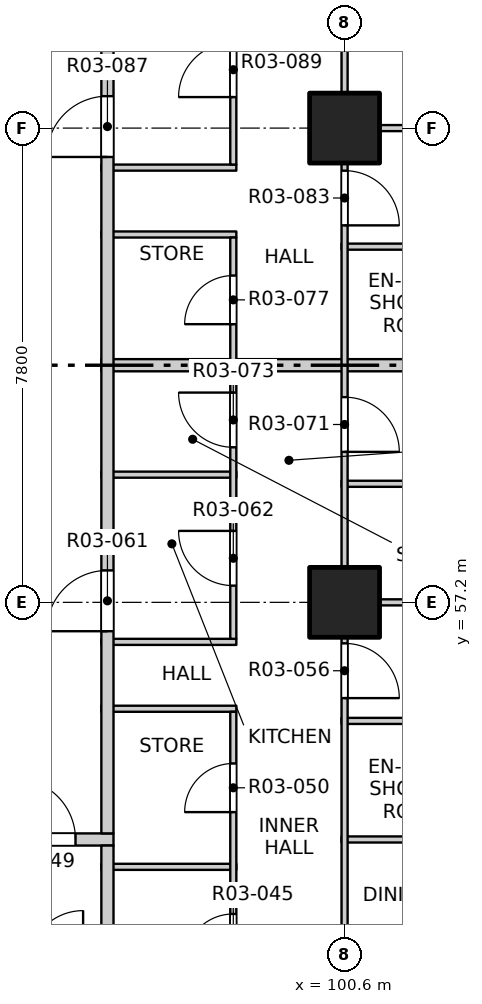
"""IFC4 building model, lengths in metres.
Left out: names, types, materials, properties, quantities, classifications, styles, units other than length and angle.
Written with IfcOpenShell. Run it as: python <this file> out.ifc"""

import sys

from ifc_helpers import new_model, si_unit, direction, frame, frame_2d, origin, origin_2d, place, context, subcontext, project, spatial, rectangle, extrude, element, fill, save


model = new_model("IFC4")
c1 = context("Model", 3, precision=1e-05, world=origin(), true_north=direction((0.0, 1.0)))
c2 = subcontext(c1, "Body", "Model", "MODEL_VIEW")
j1 = project(units=[si_unit("LENGTHUNIT", "METRE"), si_unit("PLANEANGLEUNIT", "RADIAN")], contexts=[c1])
p1 = place(None, origin())
s1 = spatial("IfcSite", under=j1, at=p1, CompositionType="ELEMENT")
p2 = place(p1, origin())
s2 = spatial("IfcBuilding", under=s1, at=p2, CompositionType="ELEMENT")
p3 = place(p2, frame((0.0, 0.0, 43.3)))
s3 = spatial("IfcBuildingStorey", under=s2, at=p3, CompositionType="ELEMENT", Elevation=43.3)
for number, where, z_axis, x_axis in (
    (1, (100.6, 57.2, -0.25), (0.0, 0.0, 1.0), (1.0, 0.0, 0.0)),
    (2, (100.6, 65.0, -0.25), (0.0, 0.0, 1.0), (1.0, 0.0, 0.0)),
):
    element("IfcColumn", number, at=place(p3, frame(where, z_axis=z_axis, x_axis=x_axis)), inside=s3, PredefinedType="COLUMN", context=c2, shape_type="SweptSolid", body=[
        extrude(rectangle(XDim=1.15, YDim=1.15, at=origin_2d()), origin(), (0.0, 0.0, 1.0), 3.35),
    ])
p4 = place(p3, frame((96.6, 52.85, 0.0), z_axis=(0.0, 0.0, 1.0), x_axis=(1.0, 0.0, 0.0)))
e3 = element("IfcWall", 3, at=p4, inside=s3, PredefinedType="PARTITIONING", context=c2, shape_type="SweptSolid", body=[
    extrude(rectangle(XDim=2.22, YDim=0.1, at=frame_2d((1.11, 0.0))), origin(), (0.0, 0.0, 1.0), 3.1),
])
p5 = place(p3, frame((73.2, 53.3, 0.0), z_axis=(0.0, 0.0, 1.0), x_axis=(1.0, 0.0, 0.0)))
e4 = element("IfcWall", 4, at=p5, inside=s3, PredefinedType="PARTITIONING", context=c2, shape_type="SweptSolid", body=[
    extrude(rectangle(XDim=23.6, YDim=0.2, at=frame_2d((11.8, 0.0))), origin(), (0.0, 0.0, 1.0), 3.1),
])
p6 = place(p5, frame((2.825, 0.0, 0.0)))
e5 = element("IfcOpeningElement", 5, at=p6, cuts=e4, PredefinedType="OPENING", context=c2, shape_type="SweptSolid", body=[
    extrude(rectangle(XDim=1.0, YDim=2.1, at=frame_2d((0.5, 1.05))), frame((0.0, 0.11, 0.0), z_axis=(0.0, -1.0, 0.0), x_axis=(1.0, 0.0, 0.0)), (0.0, 0.0, 1.0), 0.22),
])
p7 = place(p5, frame((14.025, 0.0, 0.0)))
e6 = element("IfcOpeningElement", 6, at=p7, cuts=e4, PredefinedType="OPENING", context=c2, shape_type="SweptSolid", body=[
    extrude(rectangle(XDim=1.0, YDim=2.1, at=frame_2d((0.5, 1.05))), frame((0.0, 0.11, 0.0), z_axis=(0.0, -1.0, 0.0), x_axis=(1.0, 0.0, 0.0)), (0.0, 0.0, 1.0), 0.22),
])
p8 = place(p5, frame((21.975, 0.0, 0.0)))
e7 = element("IfcOpeningElement", 7, at=p8, cuts=e4, PredefinedType="OPENING", context=c2, shape_type="SweptSolid", body=[
    extrude(rectangle(XDim=1.0, YDim=2.1, at=frame_2d((0.5, 1.05))), frame((0.0, 0.11, 0.0), z_axis=(0.0, -1.0, 0.0), x_axis=(1.0, 0.0, 0.0)), (0.0, 0.0, 1.0), 0.22),
])
p9 = place(p3, frame((100.55, 53.3, 0.0), z_axis=(0.0, 0.0, 1.0), x_axis=(1.0, 0.0, 0.0)))
e8 = element("IfcWall", 8, at=p9, inside=s3, PredefinedType="PARTITIONING", context=c2, shape_type="SweptSolid", body=[
    extrude(rectangle(XDim=7.55, YDim=0.1, at=frame_2d((3.775, 0.0))), origin(), (0.0, 0.0, 1.0), 3.1),
])
p10 = place(p3, frame((100.55, 55.25, 0.0), z_axis=(0.0, 0.0, 1.0), x_axis=(1.0, 0.0, 0.0)))
e9 = element("IfcWall", 9, at=p10, inside=s3, PredefinedType="PARTITIONING", context=c2, shape_type="SweptSolid", body=[
    extrude(rectangle(XDim=3.55, YDim=0.1, at=frame_2d((1.775, 0.0))), origin(), (0.0, 0.0, 1.0), 3.1),
])
for number, where, z_axis, x_axis in (
    (10, (96.6, 55.45, 0.0), (0.0, 0.0, 1.0), (1.0, 0.0, 0.0)),
    (11, (96.6, 56.55, 0.0), (0.0, 0.0, 1.0), (1.0, 0.0, 0.0)),
):
    element("IfcWall", number, at=place(p3, frame(where, z_axis=z_axis, x_axis=x_axis)), inside=s3, PredefinedType="PARTITIONING", context=c2, shape_type="SweptSolid", body=[
        extrude(rectangle(XDim=2.22, YDim=0.1, at=frame_2d((1.11, 0.0))), origin(), (0.0, 0.0, 1.0), 3.1),
    ])
p11 = place(p3, frame((100.55, 57.2, 0.0), z_axis=(0.0, 0.0, 1.0), x_axis=(1.0, 0.0, 0.0)))
e12 = element("IfcWall", 12, at=p11, inside=s3, PredefinedType="PARTITIONING", context=c2, shape_type="SweptSolid", body=[
    extrude(rectangle(XDim=7.55, YDim=0.1, at=frame_2d((3.775, 0.0))), origin(), (0.0, 0.0, 1.0), 3.1),
])
p12 = place(p3, frame((100.55, 59.15, 0.0), z_axis=(0.0, 0.0, 1.0), x_axis=(1.0, 0.0, 0.0)))
e13 = element("IfcWall", 13, at=p12, inside=s3, PredefinedType="PARTITIONING", context=c2, shape_type="SweptSolid", body=[
    extrude(rectangle(XDim=3.55, YDim=0.1, at=frame_2d((1.775, 0.0))), origin(), (0.0, 0.0, 1.0), 3.1),
])
p13 = place(p3, frame((96.6, 59.3, 0.0), z_axis=(0.0, 0.0, 1.0), x_axis=(1.0, 0.0, 0.0)))
e14 = element("IfcWall", 14, at=p13, inside=s3, PredefinedType="PARTITIONING", context=c2, shape_type="SweptSolid", body=[
    extrude(rectangle(XDim=2.22, YDim=0.1, at=frame_2d((1.11, 0.0))), origin(), (0.0, 0.0, 1.0), 3.1),
])
p14 = place(p3, frame((96.6, 61.1, 0.0), z_axis=(0.0, 0.0, 1.0), x_axis=(1.0, 0.0, 0.0)))
e15 = element("IfcWall", 15, at=p14, inside=s3, PredefinedType="PARTITIONING", context=c2, shape_type="SweptSolid", body=[
    extrude(rectangle(XDim=11.5, YDim=0.2, at=frame_2d((5.75, 0.0))), origin(), (0.0, 0.0, 1.0), 3.1),
])
p15 = place(p3, frame((100.55, 63.05, 0.0), z_axis=(0.0, 0.0, 1.0), x_axis=(1.0, 0.0, 0.0)))
e16 = element("IfcWall", 16, at=p15, inside=s3, PredefinedType="PARTITIONING", context=c2, shape_type="SweptSolid", body=[
    extrude(rectangle(XDim=3.55, YDim=0.1, at=frame_2d((1.775, 0.0))), origin(), (0.0, 0.0, 1.0), 3.1),
])
for number, where, z_axis, x_axis in (
    (17, (96.6, 63.25, 0.0), (0.0, 0.0, 1.0), (1.0, 0.0, 0.0)),
    (18, (96.6, 64.35, 0.0), (0.0, 0.0, 1.0), (1.0, 0.0, 0.0)),
):
    element("IfcWall", number, at=place(p3, frame(where, z_axis=z_axis, x_axis=x_axis)), inside=s3, PredefinedType="PARTITIONING", context=c2, shape_type="SweptSolid", body=[
        extrude(rectangle(XDim=2.22, YDim=0.1, at=frame_2d((1.11, 0.0))), origin(), (0.0, 0.0, 1.0), 3.1),
    ])
p16 = place(p3, frame((100.55, 65.0, 0.0), z_axis=(0.0, 0.0, 1.0), x_axis=(1.0, 0.0, 0.0)))
e19 = element("IfcWall", 19, at=p16, inside=s3, PredefinedType="PARTITIONING", context=c2, shape_type="SweptSolid", body=[
    extrude(rectangle(XDim=7.55, YDim=0.1, at=frame_2d((3.775, 0.0))), origin(), (0.0, 0.0, 1.0), 3.1),
])
p17 = place(p3, frame((96.7, 41.9, 0.0), z_axis=(0.0, 0.0, 1.0), x_axis=(0.0, 1.0, 0.0)))
e20 = element("IfcWall", 20, at=p17, inside=s3, PredefinedType="PARTITIONING", context=c2, shape_type="SweptSolid", body=[
    extrude(rectangle(XDim=11.3, YDim=0.2, at=frame_2d((5.65, 0.0))), origin(), (0.0, 0.0, 1.0), 3.1),
])
p18 = place(p3, frame((96.7, 53.4, 0.0), z_axis=(0.0, 0.0, 1.0), x_axis=(0.0, 1.0, 0.0)))
e21 = element("IfcWall", 21, at=p18, inside=s3, PredefinedType="PARTITIONING", context=c2, shape_type="SweptSolid", body=[
    extrude(rectangle(XDim=31.0, YDim=0.2, at=frame_2d((15.5, 0.0))), origin(), (0.0, 0.0, 1.0), 3.1),
])
p19 = place(p18, frame((3.325, 0.0, 0.0)))
e22 = element("IfcOpeningElement", 22, at=p19, cuts=e21, PredefinedType="OPENING", context=c2, shape_type="SweptSolid", body=[
    extrude(rectangle(XDim=1.0, YDim=2.1, at=frame_2d((0.5, 1.05))), frame((0.0, 0.11, 0.0), z_axis=(0.0, -1.0, 0.0), x_axis=(1.0, 0.0, 0.0)), (0.0, 0.0, 1.0), 0.22),
])
p20 = place(p18, frame((11.125, 0.0, 0.0)))
e23 = element("IfcOpeningElement", 23, at=p20, cuts=e21, PredefinedType="OPENING", context=c2, shape_type="SweptSolid", body=[
    extrude(rectangle(XDim=1.0, YDim=2.1, at=frame_2d((0.5, 1.05))), frame((0.0, 0.11, 0.0), z_axis=(0.0, -1.0, 0.0), x_axis=(1.0, 0.0, 0.0)), (0.0, 0.0, 1.0), 0.22),
])
p21 = place(p18, frame((26.875, 0.0, 0.0)))
e24 = element("IfcOpeningElement", 24, at=p21, cuts=e21, PredefinedType="OPENING", context=c2, shape_type="SweptSolid", body=[
    extrude(rectangle(XDim=1.0, YDim=2.1, at=frame_2d((0.5, 1.05))), frame((0.0, 0.11, 0.0), z_axis=(0.0, -1.0, 0.0), x_axis=(1.0, 0.0, 0.0)), (0.0, 0.0, 1.0), 0.22),
])
p22 = place(p3, frame((98.77, 45.55, 0.0), z_axis=(0.0, 0.0, 1.0), x_axis=(0.0, 1.0, 0.0)))
e25 = element("IfcWall", 25, at=p22, inside=s3, PredefinedType="PARTITIONING", context=c2, shape_type="SweptSolid", body=[
    extrude(rectangle(XDim=9.85, YDim=0.1, at=frame_2d((4.925, 0.0))), origin(), (0.0, 0.0, 1.0), 3.1),
])
p23 = place(p22, frame((0.85, 0.0, 0.0)))
e26 = element("IfcOpeningElement", 26, at=p23, cuts=e25, PredefinedType="OPENING", context=c2, shape_type="SweptSolid", body=[
    extrude(rectangle(XDim=0.8, YDim=2.1, at=frame_2d((0.4, 1.05))), frame((0.0, 0.06, 0.0), z_axis=(0.0, -1.0, 0.0), x_axis=(1.0, 0.0, 0.0)), (0.0, 0.0, 1.0), 0.12),
])
p24 = place(p22, frame((3.3, 0.0, 0.0)))
e27 = element("IfcOpeningElement", 27, at=p24, cuts=e25, PredefinedType="OPENING", context=c2, shape_type="SweptSolid", body=[
    extrude(rectangle(XDim=0.9, YDim=2.1, at=frame_2d((0.45, 1.05))), frame((0.0, 0.06, 0.0), z_axis=(0.0, -1.0, 0.0), x_axis=(1.0, 0.0, 0.0)), (0.0, 0.0, 1.0), 0.12),
])
p25 = place(p22, frame((5.725, 0.0, 0.0)))
e28 = element("IfcOpeningElement", 28, at=p25, cuts=e25, PredefinedType="OPENING", context=c2, shape_type="SweptSolid", body=[
    extrude(rectangle(XDim=0.8, YDim=2.1, at=frame_2d((0.4, 1.05))), frame((0.0, 0.06, 0.0), z_axis=(0.0, -1.0, 0.0), x_axis=(1.0, 0.0, 0.0)), (0.0, 0.0, 1.0), 0.12),
])
p26 = place(p22, frame((8.2, 0.0, 0.0)))
e29 = element("IfcOpeningElement", 29, at=p26, cuts=e25, PredefinedType="OPENING", context=c2, shape_type="SweptSolid", body=[
    extrude(rectangle(XDim=0.8, YDim=2.1, at=frame_2d((0.4, 1.05))), frame((0.0, 0.06, 0.0), z_axis=(0.0, -1.0, 0.0), x_axis=(1.0, 0.0, 0.0)), (0.0, 0.0, 1.0), 0.12),
])
p27 = place(p3, frame((98.77, 56.6, 0.0), z_axis=(0.0, 0.0, 1.0), x_axis=(0.0, 1.0, 0.0)))
e30 = element("IfcWall", 30, at=p27, inside=s3, PredefinedType="PARTITIONING", context=c2, shape_type="SweptSolid", body=[
    extrude(rectangle(XDim=6.6, YDim=0.1, at=frame_2d((3.3, 0.0))), origin(), (0.0, 0.0, 1.0), 3.1),
])
p28 = place(p27, frame((0.875, 0.0, 0.0)))
e31 = element("IfcOpeningElement", 31, at=p28, cuts=e30, PredefinedType="OPENING", context=c2, shape_type="SweptSolid", body=[
    extrude(rectangle(XDim=0.9, YDim=2.1, at=frame_2d((0.45, 1.05))), frame((0.0, 0.06, 0.0), z_axis=(0.0, -1.0, 0.0), x_axis=(1.0, 0.0, 0.0)), (0.0, 0.0, 1.0), 0.12),
])
p29 = place(p27, frame((3.15, 0.0, 0.0)))
e32 = element("IfcOpeningElement", 32, at=p29, cuts=e30, PredefinedType="OPENING", context=c2, shape_type="SweptSolid", body=[
    extrude(rectangle(XDim=0.9, YDim=2.1, at=frame_2d((0.45, 1.05))), frame((0.0, 0.06, 0.0), z_axis=(0.0, -1.0, 0.0), x_axis=(1.0, 0.0, 0.0)), (0.0, 0.0, 1.0), 0.12),
])
p30 = place(p27, frame((5.175, 0.0, 0.0)))
e33 = element("IfcOpeningElement", 33, at=p30, cuts=e30, PredefinedType="OPENING", context=c2, shape_type="SweptSolid", body=[
    extrude(rectangle(XDim=0.8, YDim=2.1, at=frame_2d((0.4, 1.05))), frame((0.0, 0.06, 0.0), z_axis=(0.0, -1.0, 0.0), x_axis=(1.0, 0.0, 0.0)), (0.0, 0.0, 1.0), 0.12),
])
p31 = place(p3, frame((98.77, 64.4, 0.0), z_axis=(0.0, 0.0, 1.0), x_axis=(0.0, 1.0, 0.0)))
e34 = element("IfcWall", 34, at=p31, inside=s3, PredefinedType="PARTITIONING", context=c2, shape_type="SweptSolid", body=[
    extrude(rectangle(XDim=14.55, YDim=0.1, at=frame_2d((7.275, 0.0))), origin(), (0.0, 0.0, 1.0), 3.1),
])
p32 = place(p31, frame((1.11, 0.0, 0.0)))
e35 = element("IfcOpeningElement", 35, at=p32, cuts=e34, PredefinedType="OPENING", context=c2, shape_type="SweptSolid", body=[
    extrude(rectangle(XDim=0.9, YDim=2.1, at=frame_2d((0.45, 1.05))), frame((0.0, 0.06, 0.0), z_axis=(0.0, -1.0, 0.0), x_axis=(1.0, 0.0, 0.0)), (0.0, 0.0, 1.0), 0.12),
])
p33 = place(p31, frame((4.185, 0.0, 0.0)))
e36 = element("IfcOpeningElement", 36, at=p33, cuts=e34, PredefinedType="OPENING", context=c2, shape_type="SweptSolid", body=[
    extrude(rectangle(XDim=0.8, YDim=2.1, at=frame_2d((0.4, 1.05))), frame((0.0, 0.06, 0.0), z_axis=(0.0, -1.0, 0.0), x_axis=(1.0, 0.0, 0.0)), (0.0, 0.0, 1.0), 0.12),
])
p34 = place(p31, frame((6.75, 0.0, 0.0)))
e37 = element("IfcOpeningElement", 37, at=p34, cuts=e34, PredefinedType="OPENING", context=c2, shape_type="SweptSolid", body=[
    extrude(rectangle(XDim=0.9, YDim=2.1, at=frame_2d((0.45, 1.05))), frame((0.0, 0.06, 0.0), z_axis=(0.0, -1.0, 0.0), x_axis=(1.0, 0.0, 0.0)), (0.0, 0.0, 1.0), 0.12),
])
p35 = place(p31, frame((8.85, 0.0, 0.0)))
e38 = element("IfcOpeningElement", 38, at=p35, cuts=e34, PredefinedType="OPENING", context=c2, shape_type="SweptSolid", body=[
    extrude(rectangle(XDim=0.9, YDim=2.1, at=frame_2d((0.45, 1.05))), frame((0.0, 0.06, 0.0), z_axis=(0.0, -1.0, 0.0), x_axis=(1.0, 0.0, 0.0)), (0.0, 0.0, 1.0), 0.12),
])
p36 = place(p31, frame((10.875, 0.0, 0.0)))
e39 = element("IfcOpeningElement", 39, at=p36, cuts=e34, PredefinedType="OPENING", context=c2, shape_type="SweptSolid", body=[
    extrude(rectangle(XDim=0.9, YDim=2.1, at=frame_2d((0.45, 1.05))), frame((0.0, 0.06, 0.0), z_axis=(0.0, -1.0, 0.0), x_axis=(1.0, 0.0, 0.0)), (0.0, 0.0, 1.0), 0.12),
])
p37 = place(p31, frame((13.125, 0.0, 0.0)))
e40 = element("IfcOpeningElement", 40, at=p37, cuts=e34, PredefinedType="OPENING", context=c2, shape_type="SweptSolid", body=[
    extrude(rectangle(XDim=0.8, YDim=2.1, at=frame_2d((0.4, 1.05))), frame((0.0, 0.06, 0.0), z_axis=(0.0, -1.0, 0.0), x_axis=(1.0, 0.0, 0.0)), (0.0, 0.0, 1.0), 0.12),
])
p38 = place(p3, frame((100.6, 41.9, 0.0), z_axis=(0.0, 0.0, 1.0), x_axis=(0.0, 1.0, 0.0)))
e41 = element("IfcWall", 41, at=p38, inside=s3, PredefinedType="PARTITIONING", context=c2, shape_type="SweptSolid", body=[
    extrude(rectangle(XDim=46.2, YDim=0.1, at=frame_2d((23.1, 0.0))), origin(), (0.0, 0.0, 1.0), 3.1),
])
p39 = place(p38, frame((1.2, 0.0, 0.0)))
e42 = element("IfcOpeningElement", 42, at=p39, cuts=e41, PredefinedType="OPENING", context=c2, shape_type="SweptSolid", body=[
    extrude(rectangle(XDim=0.9, YDim=2.1, at=frame_2d((0.45, 1.05))), frame((0.0, 0.06, 0.0), z_axis=(0.0, -1.0, 0.0), x_axis=(1.0, 0.0, 0.0)), (0.0, 0.0, 1.0), 0.12),
])
p40 = place(p38, frame((5.9, 0.0, 0.0)))
e43 = element("IfcOpeningElement", 43, at=p40, cuts=e41, PredefinedType="OPENING", context=c2, shape_type="SweptSolid", body=[
    extrude(rectangle(XDim=0.9, YDim=2.1, at=frame_2d((0.45, 1.05))), frame((0.0, 0.06, 0.0), z_axis=(0.0, -1.0, 0.0), x_axis=(1.0, 0.0, 0.0)), (0.0, 0.0, 1.0), 0.12),
])
p41 = place(p38, frame((9.0, 0.0, 0.0)))
e44 = element("IfcOpeningElement", 44, at=p41, cuts=e41, PredefinedType="OPENING", context=c2, shape_type="SweptSolid", body=[
    extrude(rectangle(XDim=0.9, YDim=2.1, at=frame_2d((0.45, 1.05))), frame((0.0, 0.06, 0.0), z_axis=(0.0, -1.0, 0.0), x_axis=(1.0, 0.0, 0.0)), (0.0, 0.0, 1.0), 0.12),
])
p42 = place(p38, frame((13.725, 0.0, 0.0)))
e45 = element("IfcOpeningElement", 45, at=p42, cuts=e41, PredefinedType="OPENING", context=c2, shape_type="SweptSolid", body=[
    extrude(rectangle(XDim=0.9, YDim=2.1, at=frame_2d((0.45, 1.05))), frame((0.0, 0.06, 0.0), z_axis=(0.0, -1.0, 0.0), x_axis=(1.0, 0.0, 0.0)), (0.0, 0.0, 1.0), 0.12),
])
p43 = place(p38, frame((17.775, 0.0, 0.0)))
e46 = element("IfcOpeningElement", 46, at=p43, cuts=e41, PredefinedType="OPENING", context=c2, shape_type="SweptSolid", body=[
    extrude(rectangle(XDim=0.9, YDim=2.1, at=frame_2d((0.45, 1.05))), frame((0.0, 0.06, 0.0), z_axis=(0.0, -1.0, 0.0), x_axis=(1.0, 0.0, 0.0)), (0.0, 0.0, 1.0), 0.12),
])
p44 = place(p38, frame((21.5, 0.0, 0.0)))
e47 = element("IfcOpeningElement", 47, at=p44, cuts=e41, PredefinedType="OPENING", context=c2, shape_type="SweptSolid", body=[
    extrude(rectangle(XDim=0.9, YDim=2.1, at=frame_2d((0.45, 1.05))), frame((0.0, 0.06, 0.0), z_axis=(0.0, -1.0, 0.0), x_axis=(1.0, 0.0, 0.0)), (0.0, 0.0, 1.0), 0.12),
])
p45 = place(p38, frame((24.6, 0.0, 0.0)))
e48 = element("IfcOpeningElement", 48, at=p45, cuts=e41, PredefinedType="OPENING", context=c2, shape_type="SweptSolid", body=[
    extrude(rectangle(XDim=0.9, YDim=2.1, at=frame_2d((0.45, 1.05))), frame((0.0, 0.06, 0.0), z_axis=(0.0, -1.0, 0.0), x_axis=(1.0, 0.0, 0.0)), (0.0, 0.0, 1.0), 0.12),
])
p46 = place(p38, frame((28.5, 0.0, 0.0)))
e49 = element("IfcOpeningElement", 49, at=p46, cuts=e41, PredefinedType="OPENING", context=c2, shape_type="SweptSolid", body=[
    extrude(rectangle(XDim=0.9, YDim=2.1, at=frame_2d((0.45, 1.05))), frame((0.0, 0.06, 0.0), z_axis=(0.0, -1.0, 0.0), x_axis=(1.0, 0.0, 0.0)), (0.0, 0.0, 1.0), 0.12),
])
p47 = place(p38, frame((33.375, 0.0, 0.0)))
e50 = element("IfcOpeningElement", 50, at=p47, cuts=e41, PredefinedType="OPENING", context=c2, shape_type="SweptSolid", body=[
    extrude(rectangle(XDim=0.9, YDim=2.1, at=frame_2d((0.45, 1.05))), frame((0.0, 0.06, 0.0), z_axis=(0.0, -1.0, 0.0), x_axis=(1.0, 0.0, 0.0)), (0.0, 0.0, 1.0), 0.12),
])
p48 = place(p38, frame((37.1, 0.0, 0.0)))
e51 = element("IfcOpeningElement", 51, at=p48, cuts=e41, PredefinedType="OPENING", context=c2, shape_type="SweptSolid", body=[
    extrude(rectangle(XDim=0.9, YDim=2.1, at=frame_2d((0.45, 1.05))), frame((0.0, 0.06, 0.0), z_axis=(0.0, -1.0, 0.0), x_axis=(1.0, 0.0, 0.0)), (0.0, 0.0, 1.0), 0.12),
])
p49 = place(p38, frame((40.2, 0.0, 0.0)))
e52 = element("IfcOpeningElement", 52, at=p49, cuts=e41, PredefinedType="OPENING", context=c2, shape_type="SweptSolid", body=[
    extrude(rectangle(XDim=0.9, YDim=2.1, at=frame_2d((0.45, 1.05))), frame((0.0, 0.06, 0.0), z_axis=(0.0, -1.0, 0.0), x_axis=(1.0, 0.0, 0.0)), (0.0, 0.0, 1.0), 0.12),
])
p50 = place(p38, frame((44.1, 0.0, 0.0)))
e53 = element("IfcOpeningElement", 53, at=p50, cuts=e41, PredefinedType="OPENING", context=c2, shape_type="SweptSolid", body=[
    extrude(rectangle(XDim=0.9, YDim=2.1, at=frame_2d((0.45, 1.05))), frame((0.0, 0.06, 0.0), z_axis=(0.0, -1.0, 0.0), x_axis=(1.0, 0.0, 0.0)), (0.0, 0.0, 1.0), 0.12),
])
p51 = place(p25, origin())
e54 = element("IfcDoor", 54, at=p51, inside=s3, OperationType="SINGLE_SWING_LEFT", PredefinedType="DOOR", context=c2, shape_type="SweptSolid", body=[
    extrude(rectangle(XDim=0.8, YDim=2.1, at=frame_2d((0.4, 1.05))), frame((0.0, 0.025, 0.0), z_axis=(0.0, -1.0, 0.0), x_axis=(1.0, 0.0, 0.0)), (0.0, 0.0, 1.0), 0.05),
])
fill(e28, e54)
p52 = place(p8, origin())
e55 = element("IfcDoor", 55, at=p52, inside=s3, OperationType="SINGLE_SWING_LEFT", PredefinedType="DOOR", context=c2, shape_type="SweptSolid", body=[
    extrude(rectangle(XDim=1.0, YDim=2.1, at=frame_2d((0.5, 1.05))), frame((0.0, 0.025, 0.0), z_axis=(0.0, -1.0, 0.0), x_axis=(1.0, 0.0, 0.0)), (0.0, 0.0, 1.0), 0.05),
])
fill(e7, e55)
p53 = place(p26, origin())
e56 = element("IfcDoor", 56, at=p53, inside=s3, OperationType="SINGLE_SWING_LEFT", PredefinedType="DOOR", context=c2, shape_type="SweptSolid", body=[
    extrude(rectangle(XDim=0.8, YDim=2.1, at=frame_2d((0.4, 1.05))), frame((0.0, 0.025, 0.0), z_axis=(0.0, -1.0, 0.0), x_axis=(1.0, 0.0, 0.0)), (0.0, 0.0, 1.0), 0.05),
])
fill(e29, e56)
p54 = place(p42, origin())
e57 = element("IfcDoor", 57, at=p54, inside=s3, OperationType="SINGLE_SWING_RIGHT", PredefinedType="DOOR", context=c2, shape_type="SweptSolid", body=[
    extrude(rectangle(XDim=0.9, YDim=2.1, at=frame_2d((0.45, 1.05))), frame((0.0, 0.025, 0.0), z_axis=(0.0, -1.0, 0.0), x_axis=(1.0, 0.0, 0.0)), (0.0, 0.0, 1.0), 0.05),
])
fill(e45, e57)
p55 = place(p19, origin())
e58 = element("IfcDoor", 58, at=p55, inside=s3, OperationType="SINGLE_SWING_LEFT", PredefinedType="DOOR", context=c2, shape_type="SweptSolid", body=[
    extrude(rectangle(XDim=1.0, YDim=2.1, at=frame_2d((0.5, 1.05))), frame((0.0, 0.025, 0.0), z_axis=(0.0, -1.0, 0.0), x_axis=(1.0, 0.0, 0.0)), (0.0, 0.0, 1.0), 0.05),
])
fill(e22, e58)
p56 = place(p28, origin())
e59 = element("IfcDoor", 59, at=p56, inside=s3, OperationType="SINGLE_SWING_RIGHT", PredefinedType="DOOR", context=c2, shape_type="SweptSolid", body=[
    extrude(rectangle(XDim=0.9, YDim=2.1, at=frame_2d((0.45, 1.05))), frame((0.0, 0.025, 0.0), z_axis=(0.0, -1.0, 0.0), x_axis=(1.0, 0.0, 0.0)), (0.0, 0.0, 1.0), 0.05),
])
fill(e31, e59)
p57 = place(p43, origin())
e60 = element("IfcDoor", 60, at=p57, inside=s3, OperationType="SINGLE_SWING_RIGHT", PredefinedType="DOOR", context=c2, shape_type="SweptSolid", body=[
    extrude(rectangle(XDim=0.9, YDim=2.1, at=frame_2d((0.45, 1.05))), frame((0.0, 0.025, 0.0), z_axis=(0.0, -1.0, 0.0), x_axis=(1.0, 0.0, 0.0)), (0.0, 0.0, 1.0), 0.05),
])
fill(e46, e60)
p58 = place(p29, origin())
e61 = element("IfcDoor", 61, at=p58, inside=s3, OperationType="SINGLE_SWING_RIGHT", PredefinedType="DOOR", context=c2, shape_type="SweptSolid", body=[
    extrude(rectangle(XDim=0.9, YDim=2.1, at=frame_2d((0.45, 1.05))), frame((0.0, 0.025, 0.0), z_axis=(0.0, -1.0, 0.0), x_axis=(1.0, 0.0, 0.0)), (0.0, 0.0, 1.0), 0.05),
])
fill(e32, e61)
p59 = place(p30, origin())
e62 = element("IfcDoor", 62, at=p59, inside=s3, OperationType="SINGLE_SWING_LEFT", PredefinedType="DOOR", context=c2, shape_type="SweptSolid", body=[
    extrude(rectangle(XDim=0.8, YDim=2.1, at=frame_2d((0.4, 1.05))), frame((0.0, 0.025, 0.0), z_axis=(0.0, -1.0, 0.0), x_axis=(1.0, 0.0, 0.0)), (0.0, 0.0, 1.0), 0.05),
])
fill(e33, e62)
p60 = place(p44, origin())
e63 = element("IfcDoor", 63, at=p60, inside=s3, OperationType="SINGLE_SWING_RIGHT", PredefinedType="DOOR", context=c2, shape_type="SweptSolid", body=[
    extrude(rectangle(XDim=0.9, YDim=2.1, at=frame_2d((0.45, 1.05))), frame((0.0, 0.025, 0.0), z_axis=(0.0, -1.0, 0.0), x_axis=(1.0, 0.0, 0.0)), (0.0, 0.0, 1.0), 0.05),
])
fill(e47, e63)
p61 = place(p20, origin())
e64 = element("IfcDoor", 64, at=p61, inside=s3, OperationType="SINGLE_SWING_LEFT", PredefinedType="DOOR", context=c2, shape_type="SweptSolid", body=[
    extrude(rectangle(XDim=1.0, YDim=2.1, at=frame_2d((0.5, 1.05))), frame((0.0, 0.025, 0.0), z_axis=(0.0, -1.0, 0.0), x_axis=(1.0, 0.0, 0.0)), (0.0, 0.0, 1.0), 0.05),
])
fill(e23, e64)
p62 = place(p32, origin())
e65 = element("IfcDoor", 65, at=p62, inside=s3, OperationType="SINGLE_SWING_LEFT", PredefinedType="DOOR", context=c2, shape_type="SweptSolid", body=[
    extrude(rectangle(XDim=0.9, YDim=2.1, at=frame_2d((0.45, 1.05))), frame((0.0, 0.025, 0.0), z_axis=(0.0, -1.0, 0.0), x_axis=(1.0, 0.0, 0.0)), (0.0, 0.0, 1.0), 0.05),
])
fill(e35, e65)
save(model, sys.argv[1])
